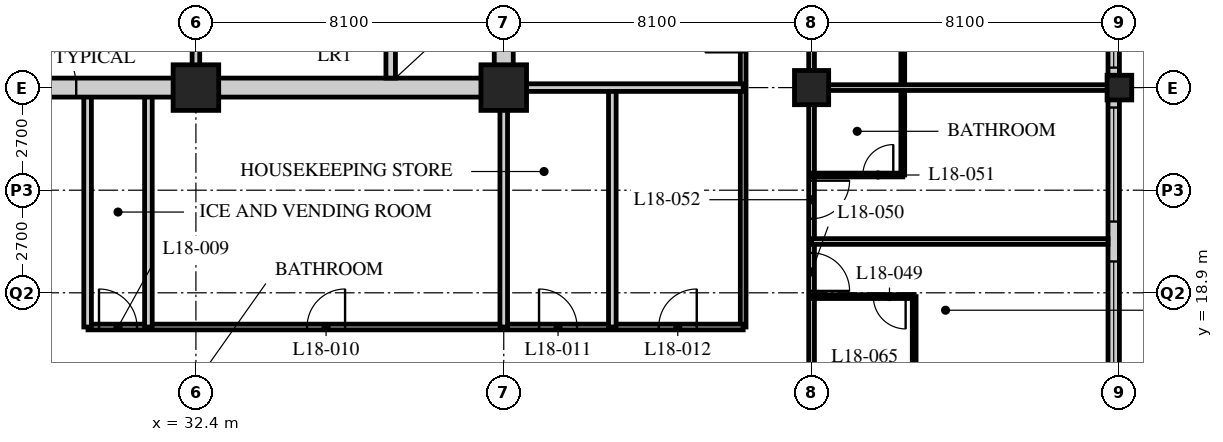
"""IFC4 building model, lengths in metres.
Left out: names, types, materials, properties, quantities, classifications, styles, units other than length and angle.
Written with IfcOpenShell. Run it as: python <this file> out.ifc"""

import sys

from ifc_helpers import new_model, si_unit, direction, frame, frame_2d, origin, origin_2d, place, context, subcontext, project, spatial, rectangle, hollow_rectangle, extrude, element, fill, save


model = new_model("IFC4")
c1 = context("Model", 3, precision=1e-05, world=origin(), true_north=direction((0.0, 1.0)))
c2 = subcontext(c1, "Body", "Model", "MODEL_VIEW")
j1 = project(units=[si_unit("LENGTHUNIT", "METRE"), si_unit("PLANEANGLEUNIT", "RADIAN")], contexts=[c1])
p1 = place(None, origin())
s1 = spatial("IfcSite", under=j1, at=p1, CompositionType="ELEMENT")
p2 = place(p1, origin())
s2 = spatial("IfcBuilding", under=s1, at=p2, CompositionType="ELEMENT")
p3 = place(p2, frame((0.0, 0.0, 73.8)))
s3 = spatial("IfcBuildingStorey", under=s2, at=p3, CompositionType="ELEMENT", Elevation=73.8)
for number, where, z_axis, x_axis in (
    (1, (32.4, 24.3, 0.0), (0.0, 0.0, 1.0), (1.0, 0.0, 0.0)),
    (2, (40.5, 24.3, 0.0), (0.0, 0.0, 1.0), (1.0, 0.0, 0.0)),
):
    element("IfcColumn", number, at=place(p3, frame(where, z_axis=z_axis, x_axis=x_axis)), inside=s3, PredefinedType="COLUMN", context=c2, shape_type="SweptSolid", body=[
        extrude(hollow_rectangle(XDim=1.2, YDim=1.2, WallThickness=0.12, at=origin_2d()), origin(), (0.0, 0.0, 1.0), 3.4),
    ])
p4 = place(p3, frame((48.6, 24.3, 0.0), z_axis=(0.0, 0.0, 1.0), x_axis=(1.0, 0.0, 0.0)))
e3 = element("IfcColumn", 3, at=p4, inside=s3, PredefinedType="COLUMN", context=c2, shape_type="SweptSolid", body=[
    extrude(hollow_rectangle(XDim=0.9, YDim=0.9, WallThickness=0.09, at=origin_2d()), origin(), (0.0, 0.0, 1.0), 3.4),
])
p5 = place(p3, frame((56.7, 24.3, 0.0), z_axis=(0.0, 0.0, 1.0), x_axis=(1.0, 0.0, 0.0)))
e4 = element("IfcColumn", 4, at=p5, inside=s3, PredefinedType="COLUMN", context=c2, shape_type="SweptSolid", body=[
    extrude(hollow_rectangle(XDim=0.65, YDim=0.65, WallThickness=0.05, at=origin_2d()), origin(), (0.0, 0.0, 1.0), 3.4),
])
p6 = place(p3, frame((56.55, 8.4, 0.0), z_axis=(0.0, 0.0, 1.0), x_axis=(0.0, 1.0, 0.0)))
e5 = element("IfcWall", 5, at=p6, inside=s3, PredefinedType="SOLIDWALL", context=c2, shape_type="SweptSolid", body=[
    extrude(rectangle(XDim=32.1, YDim=0.3, at=frame_2d((16.05, 0.0))), origin(), (0.0, 0.0, 1.0), 3.19),
])
p7 = place(p6, frame((0.225, 0.0, 0.9)))
e6 = element("IfcOpeningElement", 6, at=p7, cuts=e5, PredefinedType="OPENING", context=c2, shape_type="SweptSolid", body=[
    extrude(rectangle(XDim=3.0, YDim=2.0, at=frame_2d((1.5, 1.0))), frame((0.0, 0.16, 0.0), z_axis=(0.0, -1.0, 0.0), x_axis=(1.0, 0.0, 0.0)), (0.0, 0.0, 1.0), 0.32),
])
p8 = place(p6, frame((4.275, 0.0, 0.9)))
e7 = element("IfcOpeningElement", 7, at=p8, cuts=e5, PredefinedType="OPENING", context=c2, shape_type="SweptSolid", body=[
    extrude(rectangle(XDim=3.0, YDim=2.0, at=frame_2d((1.5, 1.0))), frame((0.0, 0.16, 0.0), z_axis=(0.0, -1.0, 0.0), x_axis=(1.0, 0.0, 0.0)), (0.0, 0.0, 1.0), 0.32),
])
p9 = place(p6, frame((8.325, 0.0, 0.9)))
e8 = element("IfcOpeningElement", 8, at=p9, cuts=e5, PredefinedType="OPENING", context=c2, shape_type="SweptSolid", body=[
    extrude(rectangle(XDim=3.0, YDim=2.0, at=frame_2d((1.5, 1.0))), frame((0.0, 0.16, 0.0), z_axis=(0.0, -1.0, 0.0), x_axis=(1.0, 0.0, 0.0)), (0.0, 0.0, 1.0), 0.32),
])
p10 = place(p6, frame((12.375, 0.0, 0.9)))
e9 = element("IfcOpeningElement", 9, at=p10, cuts=e5, PredefinedType="OPENING", context=c2, shape_type="SweptSolid", body=[
    extrude(rectangle(XDim=3.0, YDim=2.0, at=frame_2d((1.5, 1.0))), frame((0.0, 0.16, 0.0), z_axis=(0.0, -1.0, 0.0), x_axis=(1.0, 0.0, 0.0)), (0.0, 0.0, 1.0), 0.32),
])
p11 = place(p6, frame((16.425, 0.0, 0.9)))
e10 = element("IfcOpeningElement", 10, at=p11, cuts=e5, PredefinedType="OPENING", context=c2, shape_type="SweptSolid", body=[
    extrude(rectangle(XDim=3.0, YDim=2.0, at=frame_2d((1.5, 1.0))), frame((0.0, 0.16, 0.0), z_axis=(0.0, -1.0, 0.0), x_axis=(1.0, 0.0, 0.0)), (0.0, 0.0, 1.0), 0.32),
])
p12 = place(p6, frame((20.475, 0.0, 0.9)))
e11 = element("IfcOpeningElement", 11, at=p12, cuts=e5, PredefinedType="OPENING", context=c2, shape_type="SweptSolid", body=[
    extrude(rectangle(XDim=3.0, YDim=2.0, at=frame_2d((1.5, 1.0))), frame((0.0, 0.16, 0.0), z_axis=(0.0, -1.0, 0.0), x_axis=(1.0, 0.0, 0.0)), (0.0, 0.0, 1.0), 0.32),
])
p13 = place(p6, frame((24.525, 0.0, 0.9)))
e12 = element("IfcOpeningElement", 12, at=p13, cuts=e5, PredefinedType="OPENING", context=c2, shape_type="SweptSolid", body=[
    extrude(rectangle(XDim=3.0, YDim=2.0, at=frame_2d((1.5, 1.0))), frame((0.0, 0.16, 0.0), z_axis=(0.0, -1.0, 0.0), x_axis=(1.0, 0.0, 0.0)), (0.0, 0.0, 1.0), 0.32),
])
p14 = place(p6, frame((28.575, 0.0, 0.9)))
e13 = element("IfcOpeningElement", 13, at=p14, cuts=e5, PredefinedType="OPENING", context=c2, shape_type="SweptSolid", body=[
    extrude(rectangle(XDim=3.0, YDim=2.0, at=frame_2d((1.5, 1.0))), frame((0.0, 0.16, 0.0), z_axis=(0.0, -1.0, 0.0), x_axis=(1.0, 0.0, 0.0)), (0.0, 0.0, 1.0), 0.32),
])
p15 = place(p3, frame((48.6, 16.2, 0.0), z_axis=(0.0, 0.0, 1.0), x_axis=(0.0, 1.0, 0.0)))
e14 = element("IfcWall", 14, at=p15, inside=s3, PredefinedType="PARTITIONING", context=c2, shape_type="SweptSolid", body=[
    extrude(rectangle(XDim=26.1, YDim=0.15, at=frame_2d((13.05, 0.0))), origin(), (0.0, 0.0, 1.0), 2.578),
])
p16 = place(p15, frame((2.75, 0.0, 0.0)))
e15 = element("IfcOpeningElement", 15, at=p16, cuts=e14, PredefinedType="OPENING", context=c2, shape_type="SweptSolid", body=[
    extrude(rectangle(XDim=1.0, YDim=2.1, at=frame_2d((0.5, 1.05))), frame((0.0, 0.085, 0.0), z_axis=(0.0, -1.0, 0.0), x_axis=(1.0, 0.0, 0.0)), (0.0, 0.0, 1.0), 0.17),
])
p17 = place(p15, frame((4.65, 0.0, 0.0)))
e16 = element("IfcOpeningElement", 16, at=p17, cuts=e14, PredefinedType="OPENING", context=c2, shape_type="SweptSolid", body=[
    extrude(rectangle(XDim=1.0, YDim=2.1, at=frame_2d((0.5, 1.05))), frame((0.0, 0.085, 0.0), z_axis=(0.0, -1.0, 0.0), x_axis=(1.0, 0.0, 0.0)), (0.0, 0.0, 1.0), 0.17),
])
p18 = place(p15, frame((13.55, 0.0, 0.0)))
e17 = element("IfcOpeningElement", 17, at=p18, cuts=e14, PredefinedType="OPENING", context=c2, shape_type="SweptSolid", body=[
    extrude(rectangle(XDim=1.0, YDim=2.1, at=frame_2d((0.5, 1.05))), frame((0.0, 0.085, 0.0), z_axis=(0.0, -1.0, 0.0), x_axis=(1.0, 0.0, 0.0)), (0.0, 0.0, 1.0), 0.17),
])
p19 = place(p15, frame((21.65, 0.0, 0.0)))
e18 = element("IfcOpeningElement", 18, at=p19, cuts=e14, PredefinedType="OPENING", context=c2, shape_type="SweptSolid", body=[
    extrude(rectangle(XDim=1.0, YDim=2.1, at=frame_2d((0.5, 1.05))), frame((0.0, 0.085, 0.0), z_axis=(0.0, -1.0, 0.0), x_axis=(1.0, 0.0, 0.0)), (0.0, 0.0, 1.0), 0.17),
])
p20 = place(p3, frame((46.8, 18.0, 0.0), z_axis=(0.0, 0.0, 1.0), x_axis=(0.0, 1.0, 0.0)))
e19 = element("IfcWall", 19, at=p20, inside=s3, PredefinedType="PARTITIONING", context=c2, shape_type="SweptSolid", body=[
    extrude(rectangle(XDim=22.5, YDim=0.15, at=frame_2d((11.25, 0.0))), origin(), (0.0, 0.0, 1.0), 3.19),
])
p21 = place(p20, frame((7.229, 0.0, 0.0)))
e20 = element("IfcOpeningElement", 20, at=p21, cuts=e19, PredefinedType="OPENING", context=c2, shape_type="SweptSolid", body=[
    extrude(rectangle(XDim=1.0, YDim=2.1, at=frame_2d((0.5, 1.05))), frame((0.0, 0.085, 0.0), z_axis=(0.0, -1.0, 0.0), x_axis=(1.0, 0.0, 0.0)), (0.0, 0.0, 1.0), 0.17),
])
p22 = place(p20, frame((11.279, 0.0, 0.0)))
e21 = element("IfcOpeningElement", 21, at=p22, cuts=e19, PredefinedType="OPENING", context=c2, shape_type="SweptSolid", body=[
    extrude(rectangle(XDim=1.0, YDim=2.1, at=frame_2d((0.5, 1.05))), frame((0.0, 0.085, 0.0), z_axis=(0.0, -1.0, 0.0), x_axis=(1.0, 0.0, 0.0)), (0.0, 0.0, 1.0), 0.17),
])
p23 = place(p20, frame((14.7, 0.0, 0.0)))
e22 = element("IfcOpeningElement", 22, at=p23, cuts=e19, PredefinedType="OPENING", context=c2, shape_type="SweptSolid", body=[
    extrude(rectangle(XDim=1.0, YDim=2.1, at=frame_2d((0.5, 1.05))), frame((0.0, 0.085, 0.0), z_axis=(0.0, -1.0, 0.0), x_axis=(1.0, 0.0, 0.0)), (0.0, 0.0, 1.0), 0.17),
])
p24 = place(p20, frame((18.75, 0.0, 0.0)))
e23 = element("IfcOpeningElement", 23, at=p24, cuts=e19, PredefinedType="OPENING", context=c2, shape_type="SweptSolid", body=[
    extrude(rectangle(XDim=1.0, YDim=2.1, at=frame_2d((0.5, 1.05))), frame((0.0, 0.085, 0.0), z_axis=(0.0, -1.0, 0.0), x_axis=(1.0, 0.0, 0.0)), (0.0, 0.0, 1.0), 0.17),
])
p25 = place(p3, frame((29.56, 18.0, 0.0), z_axis=(0.0, 0.0, 1.0), x_axis=(1.0, 0.0, 0.0)))
e24 = element("IfcWall", 24, at=p25, inside=s3, PredefinedType="PARTITIONING", context=c2, shape_type="SweptSolid", body=[
    extrude(rectangle(XDim=17.24, YDim=0.15, at=frame_2d((8.62, 0.0))), origin(), (0.0, 0.0, 1.0), 3.19),
])
p26 = place(p25, frame((0.29, 0.0, 0.0)))
e25 = element("IfcOpeningElement", 25, at=p26, cuts=e24, PredefinedType="OPENING", context=c2, shape_type="SweptSolid", body=[
    extrude(rectangle(XDim=1.0, YDim=2.1, at=frame_2d((0.5, 1.05))), frame((0.0, 0.085, 0.0), z_axis=(0.0, -1.0, 0.0), x_axis=(1.0, 0.0, 0.0)), (0.0, 0.0, 1.0), 0.17),
])
p27 = place(p25, frame((5.765, 0.0, 0.0)))
e26 = element("IfcOpeningElement", 26, at=p27, cuts=e24, PredefinedType="OPENING", context=c2, shape_type="SweptSolid", body=[
    extrude(rectangle(XDim=1.0, YDim=2.1, at=frame_2d((0.5, 1.05))), frame((0.0, 0.085, 0.0), z_axis=(0.0, -1.0, 0.0), x_axis=(1.0, 0.0, 0.0)), (0.0, 0.0, 1.0), 0.17),
])
p28 = place(p25, frame((11.869, 0.0, 0.0)))
e27 = element("IfcOpeningElement", 27, at=p28, cuts=e24, PredefinedType="OPENING", context=c2, shape_type="SweptSolid", body=[
    extrude(rectangle(XDim=1.0, YDim=2.1, at=frame_2d((0.5, 1.05))), frame((0.0, 0.085, 0.0), z_axis=(0.0, -1.0, 0.0), x_axis=(1.0, 0.0, 0.0)), (0.0, 0.0, 1.0), 0.17),
])
p29 = place(p25, frame((15.019, 0.0, 0.0)))
e28 = element("IfcOpeningElement", 28, at=p29, cuts=e24, PredefinedType="OPENING", context=c2, shape_type="SweptSolid", body=[
    extrude(rectangle(XDim=1.0, YDim=2.1, at=frame_2d((0.5, 1.05))), frame((0.0, 0.085, 0.0), z_axis=(0.0, -1.0, 0.0), x_axis=(1.0, 0.0, 0.0)), (0.0, 0.0, 1.0), 0.17),
])
p30 = place(p3, frame((40.5, 18.0, 0.0), z_axis=(0.0, 0.0, 1.0), x_axis=(0.0, 1.0, 0.0)))
e29 = element("IfcWall", 29, at=p30, inside=s3, PredefinedType="SOLIDWALL", context=c2, shape_type="SweptSolid", body=[
    extrude(rectangle(XDim=6.3, YDim=0.2, at=frame_2d((3.15, 0.0))), origin(), (0.0, 0.0, 1.0), 2.578),
])
for number, where, z_axis, x_axis in (
    (30, (31.15, 18.0, 0.0), (0.0, 0.0, 1.0), (0.0, 1.0, 0.0)),
    (31, (43.357, 18.0, 0.0), (0.0, 0.0, 1.0), (0.0, 1.0, 0.0)),
    (32, (29.55, 18.0, 0.0), (0.0, 0.0, 1.0), (0.0, 1.0, 0.0)),
):
    element("IfcWall", number, at=place(p3, frame(where, z_axis=z_axis, x_axis=x_axis)), inside=s3, PredefinedType="SOLIDWALL", context=c2, shape_type="SweptSolid", body=[
        extrude(rectangle(XDim=6.3, YDim=0.2, at=frame_2d((3.15, 0.0))), origin(), (0.0, 0.0, 1.0), 3.19),
    ])
p31 = place(p3, frame((40.5, 24.3, 0.0), z_axis=(0.0, 0.0, 1.0), x_axis=(1.0, 0.0, 0.0)))
e33 = element("IfcWall", 33, at=p31, inside=s3, PredefinedType="SOLIDWALL", context=c2, shape_type="SweptSolid", body=[
    extrude(rectangle(XDim=6.3, YDim=0.2, at=frame_2d((3.15, 0.0))), origin(), (0.0, 0.0, 1.0), 2.578),
])
p32 = place(p3, frame((51.3, 16.2, 0.0), z_axis=(0.0, 0.0, 1.0), x_axis=(0.0, 1.0, 0.0)))
e34 = element("IfcWall", 34, at=p32, inside=s3, PredefinedType="PARTITIONING", context=c2, shape_type="SweptSolid", body=[
    extrude(rectangle(XDim=2.6, YDim=0.1, at=frame_2d((1.3, 0.0))), origin(), (0.0, 0.0, 1.0), 3.19),
])
p33 = place(p3, frame((48.6, 18.8, 0.0), z_axis=(0.0, 0.0, 1.0), x_axis=(1.0, 0.0, 0.0)))
e35 = element("IfcWall", 35, at=p33, inside=s3, PredefinedType="PARTITIONING", context=c2, shape_type="SweptSolid", body=[
    extrude(rectangle(XDim=2.7, YDim=0.1, at=frame_2d((1.35, 0.0))), origin(), (0.0, 0.0, 1.0), 3.19),
])
p34 = place(p33, frame((1.625, 0.0, 0.0)))
e36 = element("IfcOpeningElement", 36, at=p34, cuts=e35, PredefinedType="OPENING", context=c2, shape_type="SweptSolid", body=[
    extrude(rectangle(XDim=0.85, YDim=2.1, at=frame_2d((0.425, 1.05))), frame((0.0, 0.06, 0.0), z_axis=(0.0, -1.0, 0.0), x_axis=(1.0, 0.0, 0.0)), (0.0, 0.0, 1.0), 0.12),
])
p35 = place(p3, frame((48.6, 20.25, 0.0), z_axis=(0.0, 0.0, 1.0), x_axis=(1.0, 0.0, 0.0)))
e37 = element("IfcWall", 37, at=p35, inside=s3, PredefinedType="PARTITIONING", context=c2, shape_type="SweptSolid", body=[
    extrude(rectangle(XDim=7.8, YDim=0.15, at=frame_2d((3.9, 0.0))), origin(), (0.0, 0.0, 1.0), 3.19),
])
p36 = place(p3, frame((51.0, 22.0, 0.0), z_axis=(0.0, 0.0, 1.0), x_axis=(0.0, 1.0, 0.0)))
e38 = element("IfcWall", 38, at=p36, inside=s3, PredefinedType="PARTITIONING", context=c2, shape_type="SweptSolid", body=[
    extrude(rectangle(XDim=7.5, YDim=0.1, at=frame_2d((3.75, 0.0))), origin(), (0.0, 0.0, 1.0), 3.19),
])
p37 = place(p36, frame((3.6, 0.0, 0.0)))
e39 = element("IfcOpeningElement", 39, at=p37, cuts=e38, PredefinedType="OPENING", context=c2, shape_type="SweptSolid", body=[
    extrude(rectangle(XDim=0.8, YDim=2.1, at=frame_2d((0.4, 1.05))), frame((0.0, 0.06, 0.0), z_axis=(0.0, -1.0, 0.0), x_axis=(1.0, 0.0, 0.0)), (0.0, 0.0, 1.0), 0.12),
])
p38 = place(p36, frame((6.2, 0.0, 0.0)))
e40 = element("IfcOpeningElement", 40, at=p38, cuts=e38, PredefinedType="OPENING", context=c2, shape_type="SweptSolid", body=[
    extrude(rectangle(XDim=0.8, YDim=2.1, at=frame_2d((0.4, 1.05))), frame((0.0, 0.06, 0.0), z_axis=(0.0, -1.0, 0.0), x_axis=(1.0, 0.0, 0.0)), (0.0, 0.0, 1.0), 0.12),
])
p39 = place(p3, frame((48.6, 22.0, 0.0), z_axis=(0.0, 0.0, 1.0), x_axis=(1.0, 0.0, 0.0)))
e41 = element("IfcWall", 41, at=p39, inside=s3, PredefinedType="PARTITIONING", context=c2, shape_type="SweptSolid", body=[
    extrude(rectangle(XDim=2.4, YDim=0.1, at=frame_2d((1.2, 0.0))), origin(), (0.0, 0.0, 1.0), 3.19),
])
p40 = place(p39, frame((1.35, 0.0, 0.0)))
e42 = element("IfcOpeningElement", 42, at=p40, cuts=e41, PredefinedType="OPENING", context=c2, shape_type="SweptSolid", body=[
    extrude(rectangle(XDim=0.8, YDim=2.1, at=frame_2d((0.4, 1.05))), frame((0.0, 0.06, 0.0), z_axis=(0.0, -1.0, 0.0), x_axis=(1.0, 0.0, 0.0)), (0.0, 0.0, 1.0), 0.12),
])
p41 = place(p3, frame((48.6, 24.3, 0.0), z_axis=(0.0, 0.0, 1.0), x_axis=(1.0, 0.0, 0.0)))
e43 = element("IfcWall", 43, at=p41, inside=s3, PredefinedType="PARTITIONING", context=c2, shape_type="SweptSolid", body=[
    extrude(rectangle(XDim=7.8, YDim=0.15, at=frame_2d((3.9, 0.0))), origin(), (0.0, 0.0, 1.0), 2.578),
])
p42 = place(p3, frame((15.95, 24.3, 0.0), z_axis=(0.0, 0.0, 1.0), x_axis=(1.0, 0.0, 0.0)))
e44 = element("IfcWall", 44, at=p42, inside=s3, PredefinedType="SOLIDWALL", context=c2, shape_type="SweptSolid", body=[
    extrude(rectangle(XDim=24.8, YDim=0.5, at=frame_2d((12.4, 0.0))), origin(), (0.0, 0.0, 1.0), 2.54),
])
p43 = place(p42, frame((11.5, 0.0, 0.0)))
e45 = element("IfcOpeningElement", 45, at=p43, cuts=e44, PredefinedType="OPENING", context=c2, shape_type="SweptSolid", body=[
    extrude(rectangle(XDim=1.8, YDim=2.4, at=frame_2d((0.9, 1.2))), frame((0.0, 0.26, 0.0), z_axis=(0.0, -1.0, 0.0), x_axis=(1.0, 0.0, 0.0)), (0.0, 0.0, 1.0), 0.52),
])
p44 = place(p3, frame((40.5, 24.55, 0.0), z_axis=(0.0, 0.0, 1.0), x_axis=(0.0, 1.0, 0.0)))
e46 = element("IfcWall", 46, at=p44, inside=s3, PredefinedType="SOLIDWALL", context=c2, shape_type="SweptSolid", body=[
    extrude(rectangle(XDim=15.7, YDim=0.5, at=frame_2d((7.85, 0.0))), origin(), (0.0, 0.0, 1.0), 2.578),
])
p45 = place(p3, frame((37.525, 24.55, 0.0), z_axis=(0.0, 0.0, 1.0), x_axis=(0.0, 1.0, 0.0)))
e47 = element("IfcWall", 47, at=p45, inside=s3, PredefinedType="SOLIDWALL", context=c2, shape_type="SweptSolid", body=[
    extrude(rectangle(XDim=7.75, YDim=0.25, at=frame_2d((3.875, 0.0))), origin(), (0.0, 0.0, 1.0), 3.19),
])
p46 = place(p3, frame((32.4, 24.55, 0.0), z_axis=(0.0, 0.0, 1.0), x_axis=(0.0, 1.0, 0.0)))
e48 = element("IfcWall", 48, at=p46, inside=s3, PredefinedType="PARTITIONING", context=c2, shape_type="SweptSolid", body=[
    extrude(rectangle(XDim=7.75, YDim=0.2, at=frame_2d((3.875, 0.0))), origin(), (0.0, 0.0, 1.0), 2.578),
])
p47 = place(p46, frame((1.4, 0.0, 0.0)))
e49 = element("IfcOpeningElement", 49, at=p47, cuts=e48, PredefinedType="OPENING", context=c2, shape_type="SweptSolid", body=[
    extrude(rectangle(XDim=0.9, YDim=2.1, at=frame_2d((0.45, 1.05))), frame((0.0, 0.11, 0.0), z_axis=(0.0, -1.0, 0.0), x_axis=(1.0, 0.0, 0.0)), (0.0, 0.0, 1.0), 0.22),
])
p48 = place(p46, frame((5.35, 0.0, 0.0)))
e50 = element("IfcOpeningElement", 50, at=p48, cuts=e48, PredefinedType="OPENING", context=c2, shape_type="SweptSolid", body=[
    extrude(rectangle(XDim=0.9, YDim=2.1, at=frame_2d((0.45, 1.05))), frame((0.0, 0.11, 0.0), z_axis=(0.0, -1.0, 0.0), x_axis=(1.0, 0.0, 0.0)), (0.0, 0.0, 1.0), 0.22),
])
p49 = place(p9, origin())
e51 = element("IfcWindow", 51, at=p49, inside=s3, PartitioningType="SINGLE_PANEL", PredefinedType="WINDOW", context=c2, shape_type="SweptSolid", body=[
    extrude(rectangle(XDim=3.0, YDim=2.0, at=frame_2d((1.5, 1.0))), frame((0.0, 0.03, 0.0), z_axis=(0.0, -1.0, 0.0), x_axis=(1.0, 0.0, 0.0)), (0.0, 0.0, 1.0), 0.06),
])
fill(e8, e51)
p50 = place(p10, origin())
e52 = element("IfcWindow", 52, at=p50, inside=s3, PartitioningType="SINGLE_PANEL", PredefinedType="WINDOW", context=c2, shape_type="SweptSolid", body=[
    extrude(rectangle(XDim=3.0, YDim=2.0, at=frame_2d((1.5, 1.0))), frame((0.0, 0.03, 0.0), z_axis=(0.0, -1.0, 0.0), x_axis=(1.0, 0.0, 0.0)), (0.0, 0.0, 1.0), 0.06),
])
fill(e9, e52)
p51 = place(p11, origin())
e53 = element("IfcWindow", 53, at=p51, inside=s3, PartitioningType="SINGLE_PANEL", PredefinedType="WINDOW", context=c2, shape_type="SweptSolid", body=[
    extrude(rectangle(XDim=3.0, YDim=2.0, at=frame_2d((1.5, 1.0))), frame((0.0, 0.03, 0.0), z_axis=(0.0, -1.0, 0.0), x_axis=(1.0, 0.0, 0.0)), (0.0, 0.0, 1.0), 0.06),
])
fill(e10, e53)
p52 = place(p26, origin())
e54 = element("IfcDoor", 54, at=p52, inside=s3, OperationType="SINGLE_SWING_LEFT", PredefinedType="DOOR", context=c2, shape_type="SweptSolid", body=[
    extrude(rectangle(XDim=1.0, YDim=2.1, at=frame_2d((0.5, 1.05))), frame((0.0, 0.025, 0.0), z_axis=(0.0, -1.0, 0.0), x_axis=(1.0, 0.0, 0.0)), (0.0, 0.0, 1.0), 0.05),
])
fill(e25, e54)
p53 = place(p27, origin())
e55 = element("IfcDoor", 55, at=p53, inside=s3, OperationType="SINGLE_SWING_RIGHT", PredefinedType="DOOR", context=c2, shape_type="SweptSolid", body=[
    extrude(rectangle(XDim=1.0, YDim=2.1, at=frame_2d((0.5, 1.05))), frame((0.0, 0.025, 0.0), z_axis=(0.0, -1.0, 0.0), x_axis=(1.0, 0.0, 0.0)), (0.0, 0.0, 1.0), 0.05),
])
fill(e26, e55)
p54 = place(p28, origin())
e56 = element("IfcDoor", 56, at=p54, inside=s3, OperationType="SINGLE_SWING_LEFT", PredefinedType="DOOR", context=c2, shape_type="SweptSolid", body=[
    extrude(rectangle(XDim=1.0, YDim=2.1, at=frame_2d((0.5, 1.05))), frame((0.0, 0.025, 0.0), z_axis=(0.0, -1.0, 0.0), x_axis=(1.0, 0.0, 0.0)), (0.0, 0.0, 1.0), 0.05),
])
fill(e27, e56)
p55 = place(p29, origin())
e57 = element("IfcDoor", 57, at=p55, inside=s3, OperationType="SINGLE_SWING_RIGHT", PredefinedType="DOOR", context=c2, shape_type="SweptSolid", body=[
    extrude(rectangle(XDim=1.0, YDim=2.1, at=frame_2d((0.5, 1.05))), frame((0.0, 0.025, 0.0), z_axis=(0.0, -1.0, 0.0), x_axis=(1.0, 0.0, 0.0)), (0.0, 0.0, 1.0), 0.05),
])
fill(e28, e57)
p56 = place(p34, origin())
e58 = element("IfcDoor", 58, at=p56, inside=s3, OperationType="SINGLE_SWING_LEFT", PredefinedType="DOOR", context=c2, shape_type="SweptSolid", body=[
    extrude(rectangle(XDim=0.85, YDim=2.1, at=frame_2d((0.425, 1.05))), frame((0.0, 0.025, 0.0), z_axis=(0.0, -1.0, 0.0), x_axis=(1.0, 0.0, 0.0)), (0.0, 0.0, 1.0), 0.05),
])
fill(e36, e58)
p57 = place(p16, origin())
e59 = element("IfcDoor", 59, at=p57, inside=s3, OperationType="SINGLE_SWING_RIGHT", PredefinedType="DOOR", context=c2, shape_type="SweptSolid", body=[
    extrude(rectangle(XDim=1.0, YDim=2.1, at=frame_2d((0.5, 1.05))), frame((0.0, 0.025, 0.0), z_axis=(0.0, -1.0, 0.0), x_axis=(1.0, 0.0, 0.0)), (0.0, 0.0, 1.0), 0.05),
])
fill(e15, e59)
p58 = place(p40, origin())
e60 = element("IfcDoor", 60, at=p58, inside=s3, OperationType="SINGLE_SWING_RIGHT", PredefinedType="DOOR", context=c2, shape_type="SweptSolid", body=[
    extrude(rectangle(XDim=0.8, YDim=2.1, at=frame_2d((0.4, 1.05))), frame((0.0, 0.025, 0.0), z_axis=(0.0, -1.0, 0.0), x_axis=(1.0, 0.0, 0.0)), (0.0, 0.0, 1.0), 0.05),
])
fill(e42, e60)
p59 = place(p17, origin())
e61 = element("IfcDoor", 61, at=p59, inside=s3, OperationType="SINGLE_SWING_LEFT", PredefinedType="DOOR", context=c2, shape_type="SweptSolid", body=[
    extrude(rectangle(XDim=1.0, YDim=2.1, at=frame_2d((0.5, 1.05))), frame((0.0, 0.025, 0.0), z_axis=(0.0, -1.0, 0.0), x_axis=(1.0, 0.0, 0.0)), (0.0, 0.0, 1.0), 0.05),
])
fill(e16, e61)
p60 = place(p43, origin())
e62 = element("IfcDoor", 62, at=p60, inside=s3, OperationType="DOUBLE_DOOR_SINGLE_SWING", PredefinedType="DOOR", context=c2, shape_type="SweptSolid", body=[
    extrude(rectangle(XDim=1.8, YDim=2.4, at=frame_2d((0.9, 1.2))), frame((0.0, 0.025, 0.0), z_axis=(0.0, -1.0, 0.0), x_axis=(1.0, 0.0, 0.0)), (0.0, 0.0, 1.0), 0.05),
])
fill(e45, e62)
save(model, sys.argv[1])
